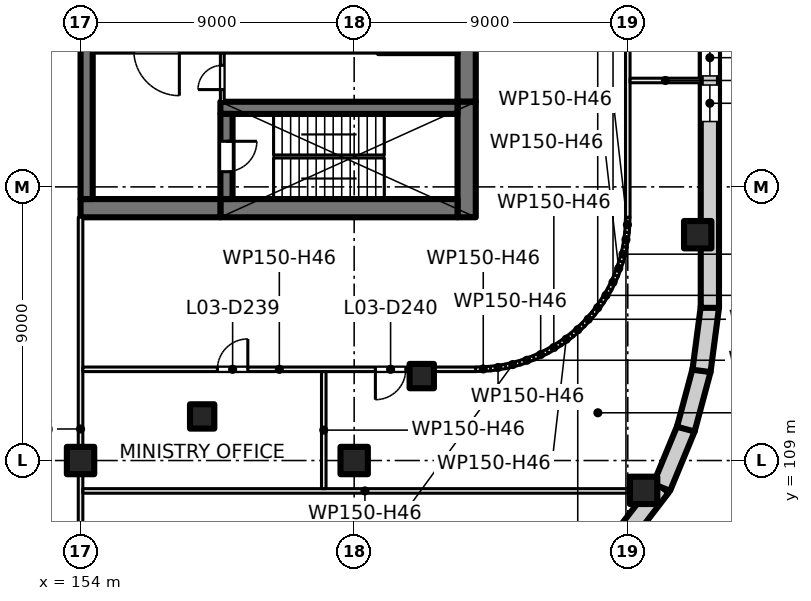
"""IFC4 building model, lengths in metres.
Left out: names, types, materials, properties, quantities, classifications, styles, units other than length and angle.
Written with IfcOpenShell. Run it as: python <this file> out.ifc"""

import sys

from ifc_helpers import new_model, si_unit, direction, frame, frame_2d, origin, origin_2d, place, context, subcontext, project, spatial, rectangle, extrude, element, fill, save


model = new_model("IFC4")
c1 = context("Model", 3, precision=1e-05, world=origin(), true_north=direction((0.0, 1.0)))
c2 = subcontext(c1, "Body", "Model", "MODEL_VIEW")
j1 = project(units=[si_unit("LENGTHUNIT", "METRE"), si_unit("PLANEANGLEUNIT", "RADIAN")], contexts=[c1])
p1 = place(None, origin())
s1 = spatial("IfcSite", under=j1, at=p1, CompositionType="ELEMENT")
p2 = place(p1, origin())
s2 = spatial("IfcBuilding", under=s1, at=p2, CompositionType="ELEMENT")
p3 = place(p2, frame((0.0, 0.0, 17.5)))
s3 = spatial("IfcBuildingStorey", under=s2, at=p3, CompositionType="ELEMENT", Elevation=17.5)
for number, where, z_axis, x_axis in (
    (1, (154.0, 109.0, 0.0), (0.0, 0.0, 1.0), (1.0, 0.0, 0.0)),
    (2, (163.0, 109.0, 0.0), (0.0, 0.0, 1.0), (1.0, 0.0, 0.0)),
    (3, (174.3, 116.427, 0.0), (0.0, 0.0, 1.0), (1.0, 0.0, 0.0)),
    (4, (172.521, 108.019, 0.0), (0.0, 0.0, 1.0), (1.0, 0.0, 0.0)),
):
    element("IfcColumn", number, at=place(p3, frame(where, z_axis=z_axis, x_axis=x_axis)), inside=s3, PredefinedType="COLUMN", context=c2, shape_type="SweptSolid", body=[
        extrude(rectangle(XDim=0.9, YDim=0.9, at=origin_2d()), origin(), (0.0, 0.0, 1.0), 5.0),
    ])
for number, where, z_axis, x_axis in (
    (5, (165.223, 111.777, 0.0), (0.0, 0.0, 1.0), (1.0, 0.0, 0.0)),
    (6, (158.0, 110.45, 0.0), (0.0, 0.0, 1.0), (1.0, 0.0, 0.0)),
):
    element("IfcColumn", number, at=place(p3, frame(where, z_axis=z_axis, x_axis=x_axis)), inside=s3, PredefinedType="COLUMN", context=c2, shape_type="SweptSolid", body=[
        extrude(rectangle(XDim=0.8, YDim=0.8, at=origin_2d()), origin(), (0.0, 0.0, 1.0), 5.0),
    ])
p4 = place(p3, frame((166.7, 135.2, 0.0), z_axis=(0.0, 0.0, 1.0), x_axis=(0.0, -1.0, 0.0)))
e7 = element("IfcWall", 7, at=p4, inside=s3, PredefinedType="SHEAR", context=c2, shape_type="SweptSolid", body=[
    extrude(rectangle(XDim=14.4, YDim=0.6, at=frame_2d((7.2, 0.0))), origin(), (0.0, 0.0, 1.0), 5.0),
])
p5 = place(p3, frame((166.7, 120.8, 0.0), z_axis=(0.0, 0.0, 1.0), x_axis=(0.0, -1.0, 0.0)))
e8 = element("IfcWall", 8, at=p5, inside=s3, PredefinedType="SHEAR", context=c2, shape_type="SweptSolid", body=[
    extrude(rectangle(XDim=3.8, YDim=0.6, at=frame_2d((1.9, 0.0))), origin(), (0.0, 0.0, 1.0), 5.0),
])
p6 = place(p3, frame((166.4, 117.3, 0.0), z_axis=(0.0, 0.0, 1.0), x_axis=(-1.0, 0.0, 0.0)))
e9 = element("IfcWall", 9, at=p6, inside=s3, PredefinedType="SHEAR", context=c2, shape_type="SweptSolid", body=[
    extrude(rectangle(XDim=7.8, YDim=0.6, at=frame_2d((3.9, 0.0))), origin(), (0.0, 0.0, 1.0), 5.0),
])
p7 = place(p3, frame((158.6, 117.3, 0.0), z_axis=(0.0, 0.0, 1.0), x_axis=(-1.0, 0.0, 0.0)))
e10 = element("IfcWall", 10, at=p7, inside=s3, PredefinedType="SHEAR", context=c2, shape_type="SweptSolid", body=[
    extrude(rectangle(XDim=4.6, YDim=0.6, at=frame_2d((2.3, 0.0))), origin(), (0.0, 0.0, 1.0), 5.0),
])
p8 = place(p3, frame((166.4, 120.6, 0.0), z_axis=(0.0, 0.0, 1.0), x_axis=(-1.0, 0.0, 0.0)))
e11 = element("IfcWall", 11, at=p8, inside=s3, PredefinedType="SHEAR", context=c2, shape_type="SweptSolid", body=[
    extrude(rectangle(XDim=7.8, YDim=0.4, at=frame_2d((3.9, 0.0))), origin(), (0.0, 0.0, 1.0), 5.0),
])
p9 = place(p3, frame((158.8, 120.4, 0.0), z_axis=(0.0, 0.0, 1.0), x_axis=(0.0, -1.0, 0.0)))
e12 = element("IfcWall", 12, at=p9, inside=s3, PredefinedType="SHEAR", context=c2, shape_type="SweptSolid", body=[
    extrude(rectangle(XDim=2.8, YDim=0.4, at=frame_2d((1.4, 0.0))), origin(), (0.0, 0.0, 1.0), 5.0),
])
p10 = place(p9, frame((0.9, 0.0, 0.0)))
e13 = element("IfcOpeningElement", 13, at=p10, cuts=e12, PredefinedType="OPENING", context=c2, shape_type="SweptSolid", body=[
    extrude(rectangle(XDim=1.0, YDim=2.1, at=frame_2d((0.5, 1.05))), frame((0.0, 0.21, 0.0), z_axis=(0.0, -1.0, 0.0), x_axis=(1.0, 0.0, 0.0)), (0.0, 0.0, 1.0), 0.42),
])
p11 = place(p3, frame((166.4, 122.6, 0.0), z_axis=(0.0, 0.0, 1.0), x_axis=(-1.0, 0.0, 0.0)))
e14 = element("IfcWall", 14, at=p11, inside=s3, PredefinedType="SHEAR", context=c2, shape_type="SweptSolid", body=[
    extrude(rectangle(XDim=2.6, YDim=0.4, at=frame_2d((1.3, 0.0))), origin(), (0.0, 0.0, 1.0), 5.0),
])
p12 = place(p3, frame((154.2, 126.2, 0.0), z_axis=(0.0, 0.0, 1.0), x_axis=(0.0, -1.0, 0.0)))
e15 = element("IfcWall", 15, at=p12, inside=s3, PredefinedType="SHEAR", context=c2, shape_type="SweptSolid", body=[
    extrude(rectangle(XDim=8.6, YDim=0.4, at=frame_2d((4.3, 0.0))), origin(), (0.0, 0.0, 1.0), 5.0),
])
p13 = place(p3, frame((173.109, 108.128, 0.0), z_axis=(0.0, 0.0, 1.0), x_axis=(-0.609058260448, -0.793125485267, 0.0)))
e16 = element("IfcWall", 16, at=p13, inside=s3, PredefinedType="SOLIDWALL", context=c2, shape_type="SweptSolid", body=[
    extrude(rectangle(XDim=2.044, YDim=0.6, at=frame_2d((1.022, 0.0))), origin(), (0.0, 0.0, 1.0), 4.6),
])
p14 = place(p3, frame((173.921, 110.069, 0.0), z_axis=(0.0, 0.0, 1.0), x_axis=(-0.382375593358, -0.924006983526, 0.0)))
e17 = element("IfcWall", 17, at=p14, inside=s3, PredefinedType="SOLIDWALL", context=c2, shape_type="SweptSolid", body=[
    extrude(rectangle(XDim=2.114, YDim=0.6, at=frame_2d((1.057, 0.0))), origin(), (0.0, 0.0, 1.0), 4.6),
])
p15 = place(p3, frame((174.432, 111.986, 0.0), z_axis=(0.0, 0.0, 1.0), x_axis=(-0.258804467146, -0.965929732323, 0.0)))
e18 = element("IfcWall", 18, at=p15, inside=s3, PredefinedType="SOLIDWALL", context=c2, shape_type="SweptSolid", body=[
    extrude(rectangle(XDim=2.022, YDim=0.6, at=frame_2d((1.011, 0.0))), origin(), (0.0, 0.0, 1.0), 4.6),
])
p16 = place(p3, frame((174.703, 114.061, 0.0), z_axis=(0.0, 0.0, 1.0), x_axis=(-0.130558200013, -0.991440646942, 0.0)))
e19 = element("IfcWall", 19, at=p16, inside=s3, PredefinedType="SOLIDWALL", context=c2, shape_type="SweptSolid", body=[
    extrude(rectangle(XDim=2.132, YDim=0.6, at=frame_2d((1.066, 0.0))), origin(), (0.0, 0.0, 1.0), 4.6),
])
p17 = place(p3, frame((174.7, 141.978, 0.0), z_axis=(0.0, 0.0, 1.0), x_axis=(0.0, -1.0, 0.0)))
e20 = element("IfcWall", 20, at=p17, inside=s3, PredefinedType="SOLIDWALL", context=c2, shape_type="SweptSolid", body=[
    extrude(rectangle(XDim=27.957, YDim=0.6, at=frame_2d((13.978, 0.0))), origin(), (0.0, 0.0, 1.0), 4.6),
])
p18 = place(p17, frame((0.83, 0.0, 0.9)))
e21 = element("IfcOpeningElement", 21, at=p18, cuts=e20, PredefinedType="OPENING", context=c2, shape_type="SweptSolid", body=[
    extrude(rectangle(XDim=3.0, YDim=3.0, at=frame_2d((1.5, 1.5))), frame((0.0, 0.31, 0.0), z_axis=(0.0, -1.0, 0.0), x_axis=(1.0, 0.0, 0.0)), (0.0, 0.0, 1.0), 0.62),
])
p19 = place(p17, frame((5.628, 0.0, 0.9)))
e22 = element("IfcOpeningElement", 22, at=p19, cuts=e20, PredefinedType="OPENING", context=c2, shape_type="SweptSolid", body=[
    extrude(rectangle(XDim=1.2, YDim=3.0, at=frame_2d((0.6, 1.5))), frame((0.0, 0.31, 0.0), z_axis=(0.0, -1.0, 0.0), x_axis=(1.0, 0.0, 0.0)), (0.0, 0.0, 1.0), 0.62),
])
p20 = place(p17, frame((10.148, 0.0, 0.9)))
e23 = element("IfcOpeningElement", 23, at=p20, cuts=e20, PredefinedType="OPENING", context=c2, shape_type="SweptSolid", body=[
    extrude(rectangle(XDim=3.0, YDim=3.0, at=frame_2d((1.5, 1.5))), frame((0.0, 0.31, 0.0), z_axis=(0.0, -1.0, 0.0), x_axis=(1.0, 0.0, 0.0)), (0.0, 0.0, 1.0), 0.62),
])
p21 = place(p17, frame((19.128, 0.0, 0.9)))
e24 = element("IfcOpeningElement", 24, at=p21, cuts=e20, PredefinedType="OPENING", context=c2, shape_type="SweptSolid", body=[
    extrude(rectangle(XDim=1.2, YDim=3.0, at=frame_2d((0.6, 1.5))), frame((0.0, 0.31, 0.0), z_axis=(0.0, -1.0, 0.0), x_axis=(1.0, 0.0, 0.0)), (0.0, 0.0, 1.0), 0.62),
])
p22 = place(p17, frame((20.628, 0.0, 0.9)))
e25 = element("IfcOpeningElement", 25, at=p22, cuts=e20, PredefinedType="OPENING", context=c2, shape_type="SweptSolid", body=[
    extrude(rectangle(XDim=1.2, YDim=3.0, at=frame_2d((0.6, 1.5))), frame((0.0, 0.31, 0.0), z_axis=(0.0, -1.0, 0.0), x_axis=(1.0, 0.0, 0.0)), (0.0, 0.0, 1.0), 0.62),
])
p23 = place(p3, frame((163.8, 122.5, 0.0), z_axis=(0.0, 0.0, 1.0), x_axis=(-1.0, 0.0, 0.0)))
e26 = element("IfcWall", 26, at=p23, inside=s3, PredefinedType="PARTITIONING", context=c2, shape_type="SweptSolid", body=[
    extrude(rectangle(XDim=9.4, YDim=0.2, at=frame_2d((4.7, 0.0))), origin(), (0.0, 0.0, 1.0), 4.6),
])
p24 = place(p23, frame((6.55, 0.0, 0.0)))
e27 = element("IfcOpeningElement", 27, at=p24, cuts=e26, PredefinedType="OPENING", context=c2, shape_type="SweptSolid", body=[
    extrude(rectangle(XDim=1.5, YDim=2.1, at=frame_2d((0.75, 1.05))), frame((0.0, 0.11, 0.0), z_axis=(0.0, -1.0, 0.0), x_axis=(1.0, 0.0, 0.0)), (0.0, 0.0, 1.0), 0.22),
])
p25 = place(p3, frame((158.663, 120.8, 0.0), z_axis=(0.0, 0.0, 1.0), x_axis=(0.0, 1.0, 0.0)))
e28 = element("IfcWall", 28, at=p25, inside=s3, PredefinedType="PARTITIONING", context=c2, shape_type="SweptSolid", body=[
    extrude(rectangle(XDim=1.6, YDim=0.125, at=frame_2d((0.8, 0.0))), origin(), (0.0, 0.0, 1.0), 4.6),
])
p26 = place(p25, frame((0.4, 0.0, 0.0)))
e29 = element("IfcOpeningElement", 29, at=p26, cuts=e28, PredefinedType="OPENING", context=c2, shape_type="SweptSolid", body=[
    extrude(rectangle(XDim=0.8, YDim=2.1, at=frame_2d((0.4, 1.05))), frame((0.0, 0.073, 0.0), z_axis=(0.0, -1.0, 0.0), x_axis=(1.0, 0.0, 0.0)), (0.0, 0.0, 1.0), 0.145),
])
p27 = place(p3, frame((154.0, 103.075, 0.0), z_axis=(0.0, 0.0, 1.0), x_axis=(0.0, 1.0, 0.0)))
e30 = element("IfcWall", 30, at=p27, inside=s3, PredefinedType="PARTITIONING", context=c2, shape_type="SweptSolid", body=[
    extrude(rectangle(XDim=13.925, YDim=0.15, at=frame_2d((6.962, 0.0))), origin(), (0.0, 0.0, 1.0), 4.6),
])
p28 = place(p3, frame((154.075, 108.0, 0.0), z_axis=(0.0, 0.0, 1.0), x_axis=(1.0, 0.0, 0.0)))
e31 = element("IfcWall", 31, at=p28, inside=s3, PredefinedType="PARTITIONING", context=c2, shape_type="SweptSolid", body=[
    extrude(rectangle(XDim=18.557, YDim=0.15, at=frame_2d((9.279, 0.0))), origin(), (0.0, 0.0, 1.0), 4.6),
])
p29 = place(p3, frame((167.002, 112.0, 0.0), z_axis=(0.0, 0.0, 1.0), x_axis=(-1.0, 0.0, 0.0)))
e32 = element("IfcWall", 32, at=p29, inside=s3, PredefinedType="PARTITIONING", context=c2, shape_type="SweptSolid", body=[
    extrude(rectangle(XDim=12.927, YDim=0.15, at=frame_2d((6.463, 0.0))), origin(), (0.0, 0.0, 1.0), 4.6),
])
p30 = place(p29, frame((7.5, 0.0, 0.0)))
e33 = element("IfcOpeningElement", 33, at=p30, cuts=e32, PredefinedType="OPENING", context=c2, shape_type="SweptSolid", body=[
    extrude(rectangle(XDim=1.0, YDim=2.1, at=frame_2d((0.5, 1.05))), frame((0.0, 0.085, 0.0), z_axis=(0.0, -1.0, 0.0), x_axis=(1.0, 0.0, 0.0)), (0.0, 0.0, 1.0), 0.17),
])
p31 = place(p29, frame((2.304, 0.0, 0.0)))
e34 = element("IfcOpeningElement", 34, at=p31, cuts=e32, PredefinedType="OPENING", context=c2, shape_type="SweptSolid", body=[
    extrude(rectangle(XDim=1.0, YDim=2.1, at=frame_2d((0.5, 1.05))), frame((0.0, 0.085, 0.0), z_axis=(0.0, -1.0, 0.0), x_axis=(1.0, 0.0, 0.0)), (0.0, 0.0, 1.0), 0.17),
])
p32 = place(p3, frame((162.0, 108.075, 0.0), z_axis=(0.0, 0.0, 1.0), x_axis=(0.0, 1.0, 0.0)))
e35 = element("IfcWall", 35, at=p32, inside=s3, PredefinedType="PARTITIONING", context=c2, shape_type="SweptSolid", body=[
    extrude(rectangle(XDim=3.85, YDim=0.15, at=frame_2d((1.925, 0.0))), origin(), (0.0, 0.0, 1.0), 4.6),
])
p33 = place(p3, frame((166.998, 112.0, 0.0), z_axis=(0.0, 0.0, 1.0), x_axis=(0.998837896651, 0.048196018647, 0.0)))
e36 = element("IfcWall", 36, at=p33, inside=s3, PredefinedType="PARTITIONING", context=c2, shape_type="SweptSolid", body=[
    extrude(rectangle(XDim=0.496, YDim=0.15, at=frame_2d((0.248, 0.0))), origin(), (0.0, 0.0, 1.0), 4.6),
])
p34 = place(p3, frame((167.486, 112.023, 0.0), z_axis=(0.0, 0.0, 1.0), x_axis=(0.988925572052, 0.148412307247, 0.0)))
e37 = element("IfcWall", 37, at=p34, inside=s3, PredefinedType="PARTITIONING", context=c2, shape_type="SweptSolid", body=[
    extrude(rectangle(XDim=0.499, YDim=0.15, at=frame_2d((0.249, 0.0))), origin(), (0.0, 0.0, 1.0), 4.6),
])
p35 = place(p3, frame((167.971, 112.095, 0.0), z_axis=(0.0, 0.0, 1.0), x_axis=(0.970113715952, 0.242650732785, 0.0)))
e38 = element("IfcWall", 38, at=p35, inside=s3, PredefinedType="PARTITIONING", context=c2, shape_type="SweptSolid", body=[
    extrude(rectangle(XDim=0.499, YDim=0.15, at=frame_2d((0.25, 0.0))), origin(), (0.0, 0.0, 1.0), 4.6),
])
for number, where, z_axis, x_axis in (
    (39, (168.447, 112.214, 0.0), (0.0, 0.0, 1.0), (0.941, 0.337, 0.0)),
    (40, (168.91, 112.379, 0.0), (0.0, 0.0, 1.0), (0.904, 0.428, 0.0)),
):
    element("IfcWall", number, at=place(p3, frame(where, z_axis=z_axis, x_axis=x_axis)), inside=s3, PredefinedType="PARTITIONING", context=c2, shape_type="SweptSolid", body=[
        extrude(rectangle(XDim=0.498, YDim=0.15, at=frame_2d((0.249, 0.0))), origin(), (0.0, 0.0, 1.0), 4.6),
    ])
p36 = place(p3, frame((169.354, 112.588, 0.0), z_axis=(0.0, 0.0, 1.0), x_axis=(0.85671397893, 0.515791778052, 0.0)))
e41 = element("IfcWall", 41, at=p36, inside=s3, PredefinedType="PARTITIONING", context=c2, shape_type="SweptSolid", body=[
    extrude(rectangle(XDim=0.499, YDim=0.15, at=frame_2d((0.249, 0.0))), origin(), (0.0, 0.0, 1.0), 4.6),
])
p37 = place(p3, frame((169.775, 112.841, 0.0), z_axis=(0.0, 0.0, 1.0), x_axis=(0.80404358372, 0.594570362092, 0.0)))
e42 = element("IfcWall", 42, at=p37, inside=s3, PredefinedType="PARTITIONING", context=c2, shape_type="SweptSolid", body=[
    extrude(rectangle(XDim=0.498, YDim=0.15, at=frame_2d((0.249, 0.0))), origin(), (0.0, 0.0, 1.0), 4.6),
])
for number, where, z_axis, x_axis in (
    (43, (170.169, 113.133, 0.0), (0.0, 0.0, 1.0), (0.742, 0.67, 0.0)),
    (44, (170.533, 113.461, 0.0), (0.0, 0.0, 1.0), (0.67, 0.742, 0.0)),
):
    element("IfcWall", number, at=place(p3, frame(where, z_axis=z_axis, x_axis=x_axis)), inside=s3, PredefinedType="PARTITIONING", context=c2, shape_type="SweptSolid", body=[
        extrude(rectangle(XDim=0.499, YDim=0.15, at=frame_2d((0.249, 0.0))), origin(), (0.0, 0.0, 1.0), 4.6),
    ])
p38 = place(p3, frame((170.863, 113.825, 0.0), z_axis=(0.0, 0.0, 1.0), x_axis=(0.594570362092, 0.80404358372, 0.0)))
e45 = element("IfcWall", 45, at=p38, inside=s3, PredefinedType="PARTITIONING", context=c2, shape_type="SweptSolid", body=[
    extrude(rectangle(XDim=0.498, YDim=0.15, at=frame_2d((0.249, 0.0))), origin(), (0.0, 0.0, 1.0), 4.6),
])
p39 = place(p3, frame((171.155, 114.219, 0.0), z_axis=(0.0, 0.0, 1.0), x_axis=(0.515791778052, 0.85671397893, 0.0)))
e46 = element("IfcWall", 46, at=p39, inside=s3, PredefinedType="PARTITIONING", context=c2, shape_type="SweptSolid", body=[
    extrude(rectangle(XDim=0.499, YDim=0.15, at=frame_2d((0.249, 0.0))), origin(), (0.0, 0.0, 1.0), 4.6),
])
for number, where, z_axis, x_axis in (
    (47, (171.408, 114.64, 0.0), (0.0, 0.0, 1.0), (0.428, 0.904, 0.0)),
    (48, (171.618, 115.084, 0.0), (0.0, 0.0, 1.0), (0.337, 0.941, 0.0)),
):
    element("IfcWall", number, at=place(p3, frame(where, z_axis=z_axis, x_axis=x_axis)), inside=s3, PredefinedType="PARTITIONING", context=c2, shape_type="SweptSolid", body=[
        extrude(rectangle(XDim=0.498, YDim=0.15, at=frame_2d((0.249, 0.0))), origin(), (0.0, 0.0, 1.0), 4.6),
    ])
p40 = place(p3, frame((171.784, 115.545, 0.0), z_axis=(0.0, 0.0, 1.0), x_axis=(0.242650732785, 0.970113715952, 0.0)))
e49 = element("IfcWall", 49, at=p40, inside=s3, PredefinedType="PARTITIONING", context=c2, shape_type="SweptSolid", body=[
    extrude(rectangle(XDim=0.499, YDim=0.15, at=frame_2d((0.25, 0.0))), origin(), (0.0, 0.0, 1.0), 4.6),
])
p41 = place(p3, frame((171.903, 116.021, 0.0), z_axis=(0.0, 0.0, 1.0), x_axis=(0.148412307247, 0.988925572052, 0.0)))
e50 = element("IfcWall", 50, at=p41, inside=s3, PredefinedType="PARTITIONING", context=c2, shape_type="SweptSolid", body=[
    extrude(rectangle(XDim=0.499, YDim=0.15, at=frame_2d((0.249, 0.0))), origin(), (0.0, 0.0, 1.0), 4.6),
])
p42 = place(p3, frame((171.976, 116.506, 0.0), z_axis=(0.0, 0.0, 1.0), x_axis=(0.048196018647, 0.998837896651, 0.0)))
e51 = element("IfcWall", 51, at=p42, inside=s3, PredefinedType="PARTITIONING", context=c2, shape_type="SweptSolid", body=[
    extrude(rectangle(XDim=0.496, YDim=0.15, at=frame_2d((0.248, 0.0))), origin(), (0.0, 0.0, 1.0), 4.6),
])
p43 = place(p3, frame((172.0, 139.002, 0.0), z_axis=(0.0, 0.0, 1.0), x_axis=(0.0, -1.0, 0.0)))
e52 = element("IfcWall", 52, at=p43, inside=s3, PredefinedType="PARTITIONING", context=c2, shape_type="SweptSolid", body=[
    extrude(rectangle(XDim=22.004, YDim=0.15, at=frame_2d((11.002, 0.0))), origin(), (0.0, 0.0, 1.0), 4.6),
])
p44 = place(p43, frame((10.252, 0.0, 0.0)))
e53 = element("IfcOpeningElement", 53, at=p44, cuts=e52, PredefinedType="OPENING", context=c2, shape_type="SweptSolid", body=[
    extrude(rectangle(XDim=1.0, YDim=2.1, at=frame_2d((0.5, 1.05))), frame((0.0, 0.085, 0.0), z_axis=(0.0, -1.0, 0.0), x_axis=(1.0, 0.0, 0.0)), (0.0, 0.0, 1.0), 0.17),
])
p45 = place(p3, frame((172.075, 121.5, 0.0), z_axis=(0.0, 0.0, 1.0), x_axis=(1.0, 0.0, 0.0)))
e54 = element("IfcWall", 54, at=p45, inside=s3, PredefinedType="PARTITIONING", context=c2, shape_type="SweptSolid", body=[
    extrude(rectangle(XDim=2.325, YDim=0.15, at=frame_2d((1.163, 0.0))), origin(), (0.0, 0.0, 1.0), 4.6),
])
p46 = place(p21, origin())
e55 = element("IfcWindow", 55, at=p46, inside=s3, PartitioningType="SINGLE_PANEL", PredefinedType="WINDOW", context=c2, shape_type="SweptSolid", body=[
    extrude(rectangle(XDim=1.2, YDim=3.0, at=frame_2d((0.6, 1.5))), frame((0.0, 0.03, 0.0), z_axis=(0.0, -1.0, 0.0), x_axis=(1.0, 0.0, 0.0)), (0.0, 0.0, 1.0), 0.06),
])
fill(e24, e55)
p47 = place(p22, origin())
e56 = element("IfcWindow", 56, at=p47, inside=s3, PartitioningType="SINGLE_PANEL", PredefinedType="WINDOW", context=c2, shape_type="SweptSolid", body=[
    extrude(rectangle(XDim=1.2, YDim=3.0, at=frame_2d((0.6, 1.5))), frame((0.0, 0.03, 0.0), z_axis=(0.0, -1.0, 0.0), x_axis=(1.0, 0.0, 0.0)), (0.0, 0.0, 1.0), 0.06),
])
fill(e25, e56)
p48 = place(p10, origin())
e57 = element("IfcDoor", 57, at=p48, inside=s3, OperationType="SINGLE_SWING_LEFT", PredefinedType="DOOR", context=c2, shape_type="SweptSolid", body=[
    extrude(rectangle(XDim=1.0, YDim=2.1, at=frame_2d((0.5, 1.05))), frame((0.0, 0.025, 0.0), z_axis=(0.0, -1.0, 0.0), x_axis=(1.0, 0.0, 0.0)), (0.0, 0.0, 1.0), 0.05),
])
fill(e13, e57)
p49 = place(p26, origin())
e58 = element("IfcDoor", 58, at=p49, inside=s3, OperationType="SINGLE_SWING_RIGHT", PredefinedType="DOOR", context=c2, shape_type="SweptSolid", body=[
    extrude(rectangle(XDim=0.8, YDim=2.1, at=frame_2d((0.4, 1.05))), frame((0.0, 0.025, 0.0), z_axis=(0.0, -1.0, 0.0), x_axis=(1.0, 0.0, 0.0)), (0.0, 0.0, 1.0), 0.05),
])
fill(e29, e58)
p50 = place(p30, origin())
e59 = element("IfcDoor", 59, at=p50, inside=s3, OperationType="SINGLE_SWING_LEFT", PredefinedType="DOOR", context=c2, shape_type="SweptSolid", body=[
    extrude(rectangle(XDim=1.0, YDim=2.1, at=frame_2d((0.5, 1.05))), frame((0.0, 0.025, 0.0), z_axis=(0.0, -1.0, 0.0), x_axis=(1.0, 0.0, 0.0)), (0.0, 0.0, 1.0), 0.05),
])
fill(e33, e59)
p51 = place(p31, origin())
e60 = element("IfcDoor", 60, at=p51, inside=s3, OperationType="SINGLE_SWING_RIGHT", PredefinedType="DOOR", context=c2, shape_type="SweptSolid", body=[
    extrude(rectangle(XDim=1.0, YDim=2.1, at=frame_2d((0.5, 1.05))), frame((0.0, 0.025, 0.0), z_axis=(0.0, -1.0, 0.0), x_axis=(1.0, 0.0, 0.0)), (0.0, 0.0, 1.0), 0.05),
])
fill(e34, e60)
save(model, sys.argv[1])
